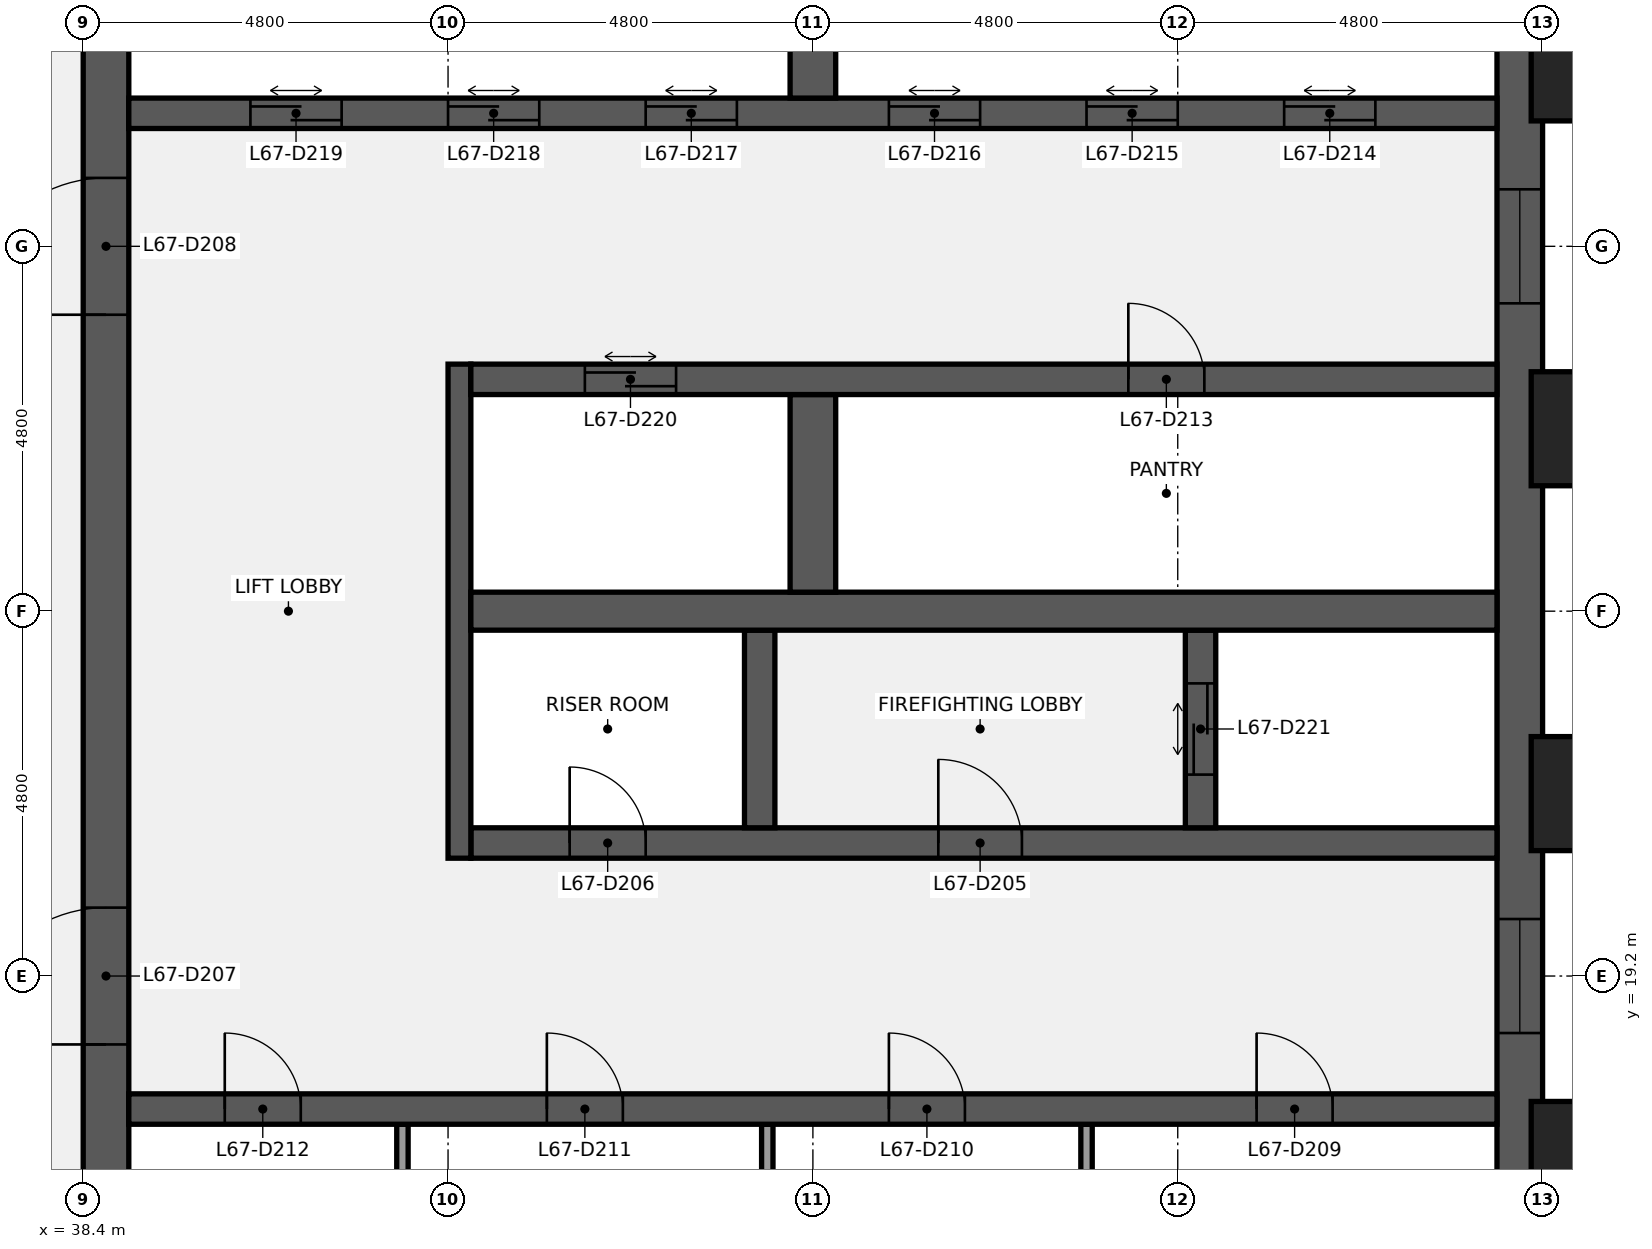
"""IFC4 building model, lengths in metres.
Left out: names, types, materials, properties, quantities, classifications, styles, units other than length and angle.
Written with IfcOpenShell. Run it as: python <this file> out.ifc"""

import sys

from ifc_helpers import new_model, si_unit, direction, frame, frame_2d, origin, origin_2d, place, context, subcontext, project, spatial, rectangle, extrude, element, fill, save


model = new_model("IFC4")
c1 = context("Model", 3, precision=1e-05, world=origin(), true_north=direction((0.0, 1.0)))
c2 = subcontext(c1, "Body", "Model", "MODEL_VIEW")
j1 = project(units=[si_unit("LENGTHUNIT", "METRE"), si_unit("PLANEANGLEUNIT", "RADIAN")], contexts=[c1])
p1 = place(None, origin())
s1 = spatial("IfcSite", under=j1, at=p1, CompositionType="ELEMENT")
p2 = place(p1, origin())
s2 = spatial("IfcBuilding", under=s1, at=p2, CompositionType="ELEMENT")
p3 = place(p2, frame((0.0, 0.0, 306.3)))
s3 = spatial("IfcBuildingStorey", under=s2, at=p3, CompositionType="ELEMENT", Elevation=306.3)
p4 = place(p3, frame((57.3, 38.4, 0.0), z_axis=(0.0, 0.0, 1.0), x_axis=(0.0, -1.0, 0.0)))
e1 = element("IfcWall", 1, at=p4, inside=s3, PredefinedType="SHEAR", context=c2, shape_type="SweptSolid", body=[
    extrude(rectangle(XDim=28.8, YDim=0.6, at=frame_2d((14.4, 0.0))), origin(), (0.0, 0.0, 1.0), 3.84),
])
p5 = place(p4, frame((18.45, 0.0, 0.9)))
e2 = element("IfcOpeningElement", 2, at=p5, cuts=e1, PredefinedType="OPENING", context=c2, shape_type="SweptSolid", body=[
    extrude(rectangle(XDim=1.5, YDim=1.5, at=frame_2d((0.75, 0.75))), frame((0.0, 0.31, 0.0), z_axis=(0.0, -1.0, 0.0), x_axis=(1.0, 0.0, 0.0)), (0.0, 0.0, 1.0), 0.62),
])
p6 = place(p4, frame((8.85, 0.0, 0.9)))
e3 = element("IfcOpeningElement", 3, at=p6, cuts=e1, PredefinedType="OPENING", context=c2, shape_type="SweptSolid", body=[
    extrude(rectangle(XDim=1.5, YDim=1.5, at=frame_2d((0.75, 0.75))), frame((0.0, 0.31, 0.0), z_axis=(0.0, -1.0, 0.0), x_axis=(1.0, 0.0, 0.0)), (0.0, 0.0, 1.0), 0.62),
])
p7 = place(p3, frame((38.7, 9.6, 0.0), z_axis=(0.0, 0.0, 1.0), x_axis=(0.0, 1.0, 0.0)))
e4 = element("IfcWall", 4, at=p7, inside=s3, PredefinedType="SHEAR", context=c2, shape_type="SweptSolid", body=[
    extrude(rectangle(XDim=28.8, YDim=0.6, at=frame_2d((14.4, 0.0))), origin(), (0.0, 0.0, 1.0), 3.84),
])
p8 = place(p7, frame((8.7, 0.0, 0.0)))
e5 = element("IfcOpeningElement", 5, at=p8, cuts=e4, PredefinedType="OPENING", context=c2, shape_type="SweptSolid", body=[
    extrude(rectangle(XDim=1.8, YDim=2.1, at=frame_2d((0.9, 1.05))), frame((0.0, 0.31, 0.0), z_axis=(0.0, -1.0, 0.0), x_axis=(1.0, 0.0, 0.0)), (0.0, 0.0, 1.0), 0.62),
])
p9 = place(p7, frame((18.3, 0.0, 0.0)))
e6 = element("IfcOpeningElement", 6, at=p9, cuts=e4, PredefinedType="OPENING", context=c2, shape_type="SweptSolid", body=[
    extrude(rectangle(XDim=1.8, YDim=2.1, at=frame_2d((0.9, 1.05))), frame((0.0, 0.31, 0.0), z_axis=(0.0, -1.0, 0.0), x_axis=(1.0, 0.0, 0.0)), (0.0, 0.0, 1.0), 0.62),
])
for number, where, z_axis, x_axis in (
    (7, (51.6, 14.65, 0.0), (0.0, 0.0, 1.0), (0.0, 1.0, 0.0)),
    (8, (47.4, 14.65, 0.0), (0.0, 0.0, 1.0), (0.0, 1.0, 0.0)),
    (9, (42.6, 14.65, 0.0), (0.0, 0.0, 1.0), (0.0, 1.0, 0.0)),
):
    element("IfcWall", number, at=place(p3, frame(where, z_axis=z_axis, x_axis=x_axis)), inside=s3, PredefinedType="PARTITIONING", context=c2, shape_type="SweptSolid", body=[
        extrude(rectangle(XDim=2.6, YDim=0.15, at=frame_2d((1.3, 0.0))), origin(), (0.0, 0.0, 1.0), 3.84),
    ])
p10 = place(p3, frame((39.0, 17.45, 0.0), z_axis=(0.0, 0.0, 1.0), x_axis=(1.0, 0.0, 0.0)))
e10 = element("IfcWall", 10, at=p10, inside=s3, PredefinedType="SHEAR", context=c2, shape_type="SweptSolid", body=[
    extrude(rectangle(XDim=18.0, YDim=0.4, at=frame_2d((9.0, 0.0))), origin(), (0.0, 0.0, 1.0), 3.84),
])
p11 = place(p10, frame((14.837, 0.0, 0.0)))
e11 = element("IfcOpeningElement", 11, at=p11, cuts=e10, PredefinedType="OPENING", context=c2, shape_type="SweptSolid", body=[
    extrude(rectangle(XDim=1.0, YDim=2.1, at=frame_2d((0.5, 1.05))), frame((0.0, 0.21, 0.0), z_axis=(0.0, -1.0, 0.0), x_axis=(1.0, 0.0, 0.0)), (0.0, 0.0, 1.0), 0.42),
])
p12 = place(p10, frame((10.0, 0.0, 0.0)))
e12 = element("IfcOpeningElement", 12, at=p12, cuts=e10, PredefinedType="OPENING", context=c2, shape_type="SweptSolid", body=[
    extrude(rectangle(XDim=1.0, YDim=2.1, at=frame_2d((0.5, 1.05))), frame((0.0, 0.21, 0.0), z_axis=(0.0, -1.0, 0.0), x_axis=(1.0, 0.0, 0.0)), (0.0, 0.0, 1.0), 0.42),
])
p13 = place(p10, frame((5.5, 0.0, 0.0)))
e13 = element("IfcOpeningElement", 13, at=p13, cuts=e10, PredefinedType="OPENING", context=c2, shape_type="SweptSolid", body=[
    extrude(rectangle(XDim=1.0, YDim=2.1, at=frame_2d((0.5, 1.05))), frame((0.0, 0.21, 0.0), z_axis=(0.0, -1.0, 0.0), x_axis=(1.0, 0.0, 0.0)), (0.0, 0.0, 1.0), 0.42),
])
p14 = place(p10, frame((1.262, 0.0, 0.0)))
e14 = element("IfcOpeningElement", 14, at=p14, cuts=e10, PredefinedType="OPENING", context=c2, shape_type="SweptSolid", body=[
    extrude(rectangle(XDim=1.0, YDim=2.1, at=frame_2d((0.5, 1.05))), frame((0.0, 0.21, 0.0), z_axis=(0.0, -1.0, 0.0), x_axis=(1.0, 0.0, 0.0)), (0.0, 0.0, 1.0), 0.42),
])
p15 = place(p3, frame((43.5, 20.95, 0.0), z_axis=(0.0, 0.0, 1.0), x_axis=(1.0, 0.0, 0.0)))
e15 = element("IfcWall", 15, at=p15, inside=s3, PredefinedType="SHEAR", context=c2, shape_type="SweptSolid", body=[
    extrude(rectangle(XDim=13.5, YDim=0.4, at=frame_2d((6.75, 0.0))), origin(), (0.0, 0.0, 1.0), 3.84),
])
p16 = place(p15, frame((6.15, 0.0, 0.0)))
e16 = element("IfcOpeningElement", 16, at=p16, cuts=e15, PredefinedType="OPENING", context=c2, shape_type="SweptSolid", body=[
    extrude(rectangle(XDim=1.1, YDim=2.1, at=frame_2d((0.55, 1.05))), frame((0.0, 0.21, 0.0), z_axis=(0.0, -1.0, 0.0), x_axis=(1.0, 0.0, 0.0)), (0.0, 0.0, 1.0), 0.42),
])
p17 = place(p15, frame((1.3, 0.0, 0.0)))
e17 = element("IfcOpeningElement", 17, at=p17, cuts=e15, PredefinedType="OPENING", context=c2, shape_type="SweptSolid", body=[
    extrude(rectangle(XDim=1.0, YDim=2.1, at=frame_2d((0.5, 1.05))), frame((0.0, 0.21, 0.0), z_axis=(0.0, -1.0, 0.0), x_axis=(1.0, 0.0, 0.0)), (0.0, 0.0, 1.0), 0.42),
])
p18 = place(p3, frame((43.35, 20.75, 0.0), z_axis=(0.0, 0.0, 1.0), x_axis=(0.0, 1.0, 0.0)))
e18 = element("IfcWall", 18, at=p18, inside=s3, PredefinedType="SHEAR", context=c2, shape_type="SweptSolid", body=[
    extrude(rectangle(XDim=6.5, YDim=0.3, at=frame_2d((3.25, 0.0))), origin(), (0.0, 0.0, 1.0), 3.84),
])
p19 = place(p3, frame((53.1, 21.15, 0.0), z_axis=(0.0, 0.0, 1.0), x_axis=(0.0, 1.0, 0.0)))
e19 = element("IfcWall", 19, at=p19, inside=s3, PredefinedType="SHEAR", context=c2, shape_type="SweptSolid", body=[
    extrude(rectangle(XDim=2.6, YDim=0.4, at=frame_2d((1.3, 0.0))), origin(), (0.0, 0.0, 1.0), 3.84),
])
p20 = place(p19, frame((0.7, 0.0, 0.0)))
e20 = element("IfcOpeningElement", 20, at=p20, cuts=e19, PredefinedType="OPENING", context=c2, shape_type="SweptSolid", body=[
    extrude(rectangle(XDim=1.2, YDim=2.1, at=frame_2d((0.6, 1.05))), frame((0.0, 0.21, 0.0), z_axis=(0.0, -1.0, 0.0), x_axis=(1.0, 0.0, 0.0)), (0.0, 0.0, 1.0), 0.42),
])
p21 = place(p3, frame((47.3, 21.15, 0.0), z_axis=(0.0, 0.0, 1.0), x_axis=(0.0, 1.0, 0.0)))
e21 = element("IfcWall", 21, at=p21, inside=s3, PredefinedType="SHEAR", context=c2, shape_type="SweptSolid", body=[
    extrude(rectangle(XDim=2.6, YDim=0.4, at=frame_2d((1.3, 0.0))), origin(), (0.0, 0.0, 1.0), 3.84),
])
p22 = place(p3, frame((43.5, 24.0, 0.0), z_axis=(0.0, 0.0, 1.0), x_axis=(1.0, 0.0, 0.0)))
e22 = element("IfcWall", 22, at=p22, inside=s3, PredefinedType="SHEAR", context=c2, shape_type="SweptSolid", body=[
    extrude(rectangle(XDim=13.5, YDim=0.5, at=frame_2d((6.75, 0.0))), origin(), (0.0, 0.0, 1.0), 3.84),
])
p23 = place(p3, frame((48.0, 24.25, 0.0), z_axis=(0.0, 0.0, 1.0), x_axis=(0.0, 1.0, 0.0)))
e23 = element("IfcWall", 23, at=p23, inside=s3, PredefinedType="SHEAR", context=c2, shape_type="SweptSolid", body=[
    extrude(rectangle(XDim=2.6, YDim=0.6, at=frame_2d((1.3, 0.0))), origin(), (0.0, 0.0, 1.0), 3.84),
])
p24 = place(p3, frame((43.5, 27.05, 0.0), z_axis=(0.0, 0.0, 1.0), x_axis=(1.0, 0.0, 0.0)))
e24 = element("IfcWall", 24, at=p24, inside=s3, PredefinedType="SHEAR", context=c2, shape_type="SweptSolid", body=[
    extrude(rectangle(XDim=13.5, YDim=0.4, at=frame_2d((6.75, 0.0))), origin(), (0.0, 0.0, 1.0), 3.84),
])
p25 = place(p24, frame((8.65, 0.0, 0.0)))
e25 = element("IfcOpeningElement", 25, at=p25, cuts=e24, PredefinedType="OPENING", context=c2, shape_type="SweptSolid", body=[
    extrude(rectangle(XDim=1.0, YDim=2.1, at=frame_2d((0.5, 1.05))), frame((0.0, 0.21, 0.0), z_axis=(0.0, -1.0, 0.0), x_axis=(1.0, 0.0, 0.0)), (0.0, 0.0, 1.0), 0.42),
])
p26 = place(p24, frame((1.5, 0.0, 0.0)))
e26 = element("IfcOpeningElement", 26, at=p26, cuts=e24, PredefinedType="OPENING", context=c2, shape_type="SweptSolid", body=[
    extrude(rectangle(XDim=1.2, YDim=2.1, at=frame_2d((0.6, 1.05))), frame((0.0, 0.21, 0.0), z_axis=(0.0, -1.0, 0.0), x_axis=(1.0, 0.0, 0.0)), (0.0, 0.0, 1.0), 0.42),
])
p27 = place(p3, frame((39.0, 30.55, 0.0), z_axis=(0.0, 0.0, 1.0), x_axis=(1.0, 0.0, 0.0)))
e27 = element("IfcWall", 27, at=p27, inside=s3, PredefinedType="SHEAR", context=c2, shape_type="SweptSolid", body=[
    extrude(rectangle(XDim=18.0, YDim=0.4, at=frame_2d((9.0, 0.0))), origin(), (0.0, 0.0, 1.0), 3.84),
])
p28 = place(p27, frame((15.2, 0.0, 0.0)))
e28 = element("IfcOpeningElement", 28, at=p28, cuts=e27, PredefinedType="OPENING", context=c2, shape_type="SweptSolid", body=[
    extrude(rectangle(XDim=1.2, YDim=2.1, at=frame_2d((0.6, 1.05))), frame((0.0, 0.21, 0.0), z_axis=(0.0, -1.0, 0.0), x_axis=(1.0, 0.0, 0.0)), (0.0, 0.0, 1.0), 0.42),
])
p29 = place(p27, frame((12.6, 0.0, 0.0)))
e29 = element("IfcOpeningElement", 29, at=p29, cuts=e27, PredefinedType="OPENING", context=c2, shape_type="SweptSolid", body=[
    extrude(rectangle(XDim=1.2, YDim=2.1, at=frame_2d((0.6, 1.05))), frame((0.0, 0.21, 0.0), z_axis=(0.0, -1.0, 0.0), x_axis=(1.0, 0.0, 0.0)), (0.0, 0.0, 1.0), 0.42),
])
p30 = place(p27, frame((10.0, 0.0, 0.0)))
e30 = element("IfcOpeningElement", 30, at=p30, cuts=e27, PredefinedType="OPENING", context=c2, shape_type="SweptSolid", body=[
    extrude(rectangle(XDim=1.2, YDim=2.1, at=frame_2d((0.6, 1.05))), frame((0.0, 0.21, 0.0), z_axis=(0.0, -1.0, 0.0), x_axis=(1.0, 0.0, 0.0)), (0.0, 0.0, 1.0), 0.42),
])
p31 = place(p27, frame((6.8, 0.0, 0.0)))
e31 = element("IfcOpeningElement", 31, at=p31, cuts=e27, PredefinedType="OPENING", context=c2, shape_type="SweptSolid", body=[
    extrude(rectangle(XDim=1.2, YDim=2.1, at=frame_2d((0.6, 1.05))), frame((0.0, 0.21, 0.0), z_axis=(0.0, -1.0, 0.0), x_axis=(1.0, 0.0, 0.0)), (0.0, 0.0, 1.0), 0.42),
])
p32 = place(p27, frame((4.2, 0.0, 0.0)))
e32 = element("IfcOpeningElement", 32, at=p32, cuts=e27, PredefinedType="OPENING", context=c2, shape_type="SweptSolid", body=[
    extrude(rectangle(XDim=1.2, YDim=2.1, at=frame_2d((0.6, 1.05))), frame((0.0, 0.21, 0.0), z_axis=(0.0, -1.0, 0.0), x_axis=(1.0, 0.0, 0.0)), (0.0, 0.0, 1.0), 0.42),
])
p33 = place(p27, frame((1.6, 0.0, 0.0)))
e33 = element("IfcOpeningElement", 33, at=p33, cuts=e27, PredefinedType="OPENING", context=c2, shape_type="SweptSolid", body=[
    extrude(rectangle(XDim=1.2, YDim=2.1, at=frame_2d((0.6, 1.05))), frame((0.0, 0.21, 0.0), z_axis=(0.0, -1.0, 0.0), x_axis=(1.0, 0.0, 0.0)), (0.0, 0.0, 1.0), 0.42),
])
p34 = place(p3, frame((48.0, 30.75, 0.0), z_axis=(0.0, 0.0, 1.0), x_axis=(0.0, 1.0, 0.0)))
e34 = element("IfcWall", 34, at=p34, inside=s3, PredefinedType="SHEAR", context=c2, shape_type="SweptSolid", body=[
    extrude(rectangle(XDim=2.6, YDim=0.6, at=frame_2d((1.3, 0.0))), origin(), (0.0, 0.0, 1.0), 3.84),
])
for number, where, z_axis, x_axis in (
    (35, (58.35, 16.8, 0.0), (0.0, 0.0, 1.0), (0.0, 1.0, 0.0)),
    (36, (58.35, 21.6, 0.0), (0.0, 0.0, 1.0), (0.0, 1.0, 0.0)),
    (37, (58.35, 26.4, 0.0), (0.0, 0.0, 1.0), (0.0, 1.0, 0.0)),
    (38, (58.35, 31.2, 0.0), (0.0, 0.0, 1.0), (0.0, 1.0, 0.0)),
):
    element("IfcColumn", number, at=place(p3, frame(where, z_axis=z_axis, x_axis=x_axis)), inside=s3, PredefinedType="PILASTER", context=c2, shape_type="SweptSolid", body=[
        extrude(rectangle(XDim=1.8, YDim=1.5, at=origin_2d()), origin(), (0.0, 0.0, 1.0), 4.0),
    ])
p35 = place(p16, origin())
e39 = element("IfcDoor", 39, at=p35, inside=s3, OperationType="SINGLE_SWING_LEFT", PredefinedType="DOOR", context=c2, shape_type="SweptSolid", body=[
    extrude(rectangle(XDim=1.1, YDim=2.1, at=frame_2d((0.55, 1.05))), frame((0.0, 0.025, 0.0), z_axis=(0.0, -1.0, 0.0), x_axis=(1.0, 0.0, 0.0)), (0.0, 0.0, 1.0), 0.05),
])
fill(e16, e39)
p36 = place(p17, origin())
e40 = element("IfcDoor", 40, at=p36, inside=s3, OperationType="SINGLE_SWING_LEFT", PredefinedType="DOOR", context=c2, shape_type="SweptSolid", body=[
    extrude(rectangle(XDim=1.0, YDim=2.1, at=frame_2d((0.5, 1.05))), frame((0.0, 0.025, 0.0), z_axis=(0.0, -1.0, 0.0), x_axis=(1.0, 0.0, 0.0)), (0.0, 0.0, 1.0), 0.05),
])
fill(e17, e40)
p37 = place(p8, origin())
e41 = element("IfcDoor", 41, at=p37, inside=s3, OperationType="DOUBLE_DOOR_SINGLE_SWING", PredefinedType="DOOR", context=c2, shape_type="SweptSolid", body=[
    extrude(rectangle(XDim=1.8, YDim=2.1, at=frame_2d((0.9, 1.05))), frame((0.0, 0.025, 0.0), z_axis=(0.0, -1.0, 0.0), x_axis=(1.0, 0.0, 0.0)), (0.0, 0.0, 1.0), 0.05),
])
fill(e5, e41)
p38 = place(p9, origin())
e42 = element("IfcDoor", 42, at=p38, inside=s3, OperationType="DOUBLE_DOOR_SINGLE_SWING", PredefinedType="DOOR", context=c2, shape_type="SweptSolid", body=[
    extrude(rectangle(XDim=1.8, YDim=2.1, at=frame_2d((0.9, 1.05))), frame((0.0, 0.025, 0.0), z_axis=(0.0, -1.0, 0.0), x_axis=(1.0, 0.0, 0.0)), (0.0, 0.0, 1.0), 0.05),
])
fill(e6, e42)
p39 = place(p11, origin())
e43 = element("IfcDoor", 43, at=p39, inside=s3, OperationType="SINGLE_SWING_LEFT", PredefinedType="DOOR", context=c2, shape_type="SweptSolid", body=[
    extrude(rectangle(XDim=1.0, YDim=2.1, at=frame_2d((0.5, 1.05))), frame((0.0, 0.025, 0.0), z_axis=(0.0, -1.0, 0.0), x_axis=(1.0, 0.0, 0.0)), (0.0, 0.0, 1.0), 0.05),
])
fill(e11, e43)
p40 = place(p12, origin())
e44 = element("IfcDoor", 44, at=p40, inside=s3, OperationType="SINGLE_SWING_LEFT", PredefinedType="DOOR", context=c2, shape_type="SweptSolid", body=[
    extrude(rectangle(XDim=1.0, YDim=2.1, at=frame_2d((0.5, 1.05))), frame((0.0, 0.025, 0.0), z_axis=(0.0, -1.0, 0.0), x_axis=(1.0, 0.0, 0.0)), (0.0, 0.0, 1.0), 0.05),
])
fill(e12, e44)
p41 = place(p13, origin())
e45 = element("IfcDoor", 45, at=p41, inside=s3, OperationType="SINGLE_SWING_LEFT", PredefinedType="DOOR", context=c2, shape_type="SweptSolid", body=[
    extrude(rectangle(XDim=1.0, YDim=2.1, at=frame_2d((0.5, 1.05))), frame((0.0, 0.025, 0.0), z_axis=(0.0, -1.0, 0.0), x_axis=(1.0, 0.0, 0.0)), (0.0, 0.0, 1.0), 0.05),
])
fill(e13, e45)
p42 = place(p14, origin())
e46 = element("IfcDoor", 46, at=p42, inside=s3, OperationType="SINGLE_SWING_LEFT", PredefinedType="DOOR", context=c2, shape_type="SweptSolid", body=[
    extrude(rectangle(XDim=1.0, YDim=2.1, at=frame_2d((0.5, 1.05))), frame((0.0, 0.025, 0.0), z_axis=(0.0, -1.0, 0.0), x_axis=(1.0, 0.0, 0.0)), (0.0, 0.0, 1.0), 0.05),
])
fill(e14, e46)
p43 = place(p25, origin())
e47 = element("IfcDoor", 47, at=p43, inside=s3, OperationType="SINGLE_SWING_LEFT", PredefinedType="DOOR", context=c2, shape_type="SweptSolid", body=[
    extrude(rectangle(XDim=1.0, YDim=2.1, at=frame_2d((0.5, 1.05))), frame((0.0, 0.025, 0.0), z_axis=(0.0, -1.0, 0.0), x_axis=(1.0, 0.0, 0.0)), (0.0, 0.0, 1.0), 0.05),
])
fill(e25, e47)
p44 = place(p28, origin())
e48 = element("IfcDoor", 48, at=p44, inside=s3, OperationType="DOUBLE_DOOR_SLIDING", PredefinedType="DOOR", context=c2, shape_type="SweptSolid", body=[
    extrude(rectangle(XDim=1.2, YDim=2.1, at=frame_2d((0.6, 1.05))), frame((0.0, 0.025, 0.0), z_axis=(0.0, -1.0, 0.0), x_axis=(1.0, 0.0, 0.0)), (0.0, 0.0, 1.0), 0.05),
])
fill(e28, e48)
p45 = place(p29, origin())
e49 = element("IfcDoor", 49, at=p45, inside=s3, OperationType="DOUBLE_DOOR_SLIDING", PredefinedType="DOOR", context=c2, shape_type="SweptSolid", body=[
    extrude(rectangle(XDim=1.2, YDim=2.1, at=frame_2d((0.6, 1.05))), frame((0.0, 0.025, 0.0), z_axis=(0.0, -1.0, 0.0), x_axis=(1.0, 0.0, 0.0)), (0.0, 0.0, 1.0), 0.05),
])
fill(e29, e49)
p46 = place(p30, origin())
e50 = element("IfcDoor", 50, at=p46, inside=s3, OperationType="DOUBLE_DOOR_SLIDING", PredefinedType="DOOR", context=c2, shape_type="SweptSolid", body=[
    extrude(rectangle(XDim=1.2, YDim=2.1, at=frame_2d((0.6, 1.05))), frame((0.0, 0.025, 0.0), z_axis=(0.0, -1.0, 0.0), x_axis=(1.0, 0.0, 0.0)), (0.0, 0.0, 1.0), 0.05),
])
fill(e30, e50)
p47 = place(p31, origin())
e51 = element("IfcDoor", 51, at=p47, inside=s3, OperationType="DOUBLE_DOOR_SLIDING", PredefinedType="DOOR", context=c2, shape_type="SweptSolid", body=[
    extrude(rectangle(XDim=1.2, YDim=2.1, at=frame_2d((0.6, 1.05))), frame((0.0, 0.025, 0.0), z_axis=(0.0, -1.0, 0.0), x_axis=(1.0, 0.0, 0.0)), (0.0, 0.0, 1.0), 0.05),
])
fill(e31, e51)
p48 = place(p32, origin())
e52 = element("IfcDoor", 52, at=p48, inside=s3, OperationType="DOUBLE_DOOR_SLIDING", PredefinedType="DOOR", context=c2, shape_type="SweptSolid", body=[
    extrude(rectangle(XDim=1.2, YDim=2.1, at=frame_2d((0.6, 1.05))), frame((0.0, 0.025, 0.0), z_axis=(0.0, -1.0, 0.0), x_axis=(1.0, 0.0, 0.0)), (0.0, 0.0, 1.0), 0.05),
])
fill(e32, e52)
p49 = place(p33, origin())
e53 = element("IfcDoor", 53, at=p49, inside=s3, OperationType="DOUBLE_DOOR_SLIDING", PredefinedType="DOOR", context=c2, shape_type="SweptSolid", body=[
    extrude(rectangle(XDim=1.2, YDim=2.1, at=frame_2d((0.6, 1.05))), frame((0.0, 0.025, 0.0), z_axis=(0.0, -1.0, 0.0), x_axis=(1.0, 0.0, 0.0)), (0.0, 0.0, 1.0), 0.05),
])
fill(e33, e53)
p50 = place(p26, origin())
e54 = element("IfcDoor", 54, at=p50, inside=s3, OperationType="DOUBLE_DOOR_SLIDING", PredefinedType="DOOR", context=c2, shape_type="SweptSolid", body=[
    extrude(rectangle(XDim=1.2, YDim=2.1, at=frame_2d((0.6, 1.05))), frame((0.0, 0.025, 0.0), z_axis=(0.0, -1.0, 0.0), x_axis=(1.0, 0.0, 0.0)), (0.0, 0.0, 1.0), 0.05),
])
fill(e26, e54)
p51 = place(p20, origin())
e55 = element("IfcDoor", 55, at=p51, inside=s3, OperationType="DOUBLE_DOOR_SLIDING", PredefinedType="DOOR", context=c2, shape_type="SweptSolid", body=[
    extrude(rectangle(XDim=1.2, YDim=2.1, at=frame_2d((0.6, 1.05))), frame((0.0, 0.025, 0.0), z_axis=(0.0, -1.0, 0.0), x_axis=(1.0, 0.0, 0.0)), (0.0, 0.0, 1.0), 0.05),
])
fill(e20, e55)
p52 = place(p5, origin())
e56 = element("IfcWindow", 56, at=p52, inside=s3, PartitioningType="SINGLE_PANEL", PredefinedType="WINDOW", context=c2, shape_type="SweptSolid", body=[
    extrude(rectangle(XDim=1.5, YDim=1.5, at=frame_2d((0.75, 0.75))), frame((0.0, 0.03, 0.0), z_axis=(0.0, -1.0, 0.0), x_axis=(1.0, 0.0, 0.0)), (0.0, 0.0, 1.0), 0.06),
])
fill(e2, e56)
p53 = place(p6, origin())
e57 = element("IfcWindow", 57, at=p53, inside=s3, PartitioningType="SINGLE_PANEL", PredefinedType="WINDOW", context=c2, shape_type="SweptSolid", body=[
    extrude(rectangle(XDim=1.5, YDim=1.5, at=frame_2d((0.75, 0.75))), frame((0.0, 0.03, 0.0), z_axis=(0.0, -1.0, 0.0), x_axis=(1.0, 0.0, 0.0)), (0.0, 0.0, 1.0), 0.06),
])
fill(e3, e57)
save(model, sys.argv[1])
